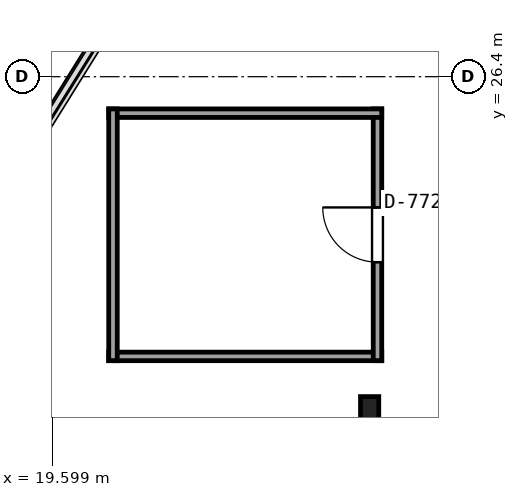
"""IFC4 building model, lengths in metres.
Left out: names, types, materials, properties, quantities, classifications, styles, units other than length and angle.
Written with IfcOpenShell. Run it as: python <this file> out.ifc"""

import sys

from ifc_helpers import new_model, si_unit, direction, frame, frame_2d, origin, origin_2d, place, context, subcontext, project, spatial, rectangle, i_section, extrude, element, fill, save


model = new_model("IFC4")
c1 = context("Model", 3, precision=1e-05, world=origin(), true_north=direction((0.0, 1.0)))
c2 = subcontext(c1, "Body", "Model", "MODEL_VIEW")
j1 = project(units=[si_unit("LENGTHUNIT", "METRE"), si_unit("PLANEANGLEUNIT", "RADIAN")], contexts=[c1])
p1 = place(None, origin())
s1 = spatial("IfcSite", under=j1, at=p1, CompositionType="ELEMENT")
p2 = place(p1, origin())
s2 = spatial("IfcBuilding", under=s1, at=p2, CompositionType="ELEMENT")
p3 = place(p2, frame((0.0, 0.0, 286.7)))
s3 = spatial("IfcBuildingStorey", under=s2, at=p3, CompositionType="ELEMENT", Elevation=286.7)
p4 = place(p3, frame((24.821, 20.889, 0.0), z_axis=(0.0, 0.0, 1.0), x_axis=(1.0, 0.0, 0.0)))
e1 = element("IfcColumn", 1, at=p4, inside=s3, PredefinedType="COLUMN", context=c2, shape_type="SweptSolid", body=[
    extrude(i_section(OverallWidth=0.3, OverallDepth=0.5, WebThickness=0.015, FlangeThickness=0.028, at=origin_2d()), origin(), (0.0, 0.0, 1.0), 2.78),
])
p5 = place(p3, frame((20.53, 21.8, 0.0), z_axis=(0.0, 0.0, 1.0), x_axis=(1.0, 0.0, 0.0)))
e2 = element("IfcWall", 2, at=p5, inside=s3, PredefinedType="PARTITIONING", context=c2, shape_type="SweptSolid", body=[
    extrude(rectangle(XDim=4.49, YDim=0.14, at=frame_2d((2.245, 0.0))), origin(), (0.0, 0.0, 1.0), 2.305),
])
p6 = place(p3, frame((24.95, 21.73, 0.0), z_axis=(0.0, 0.0, 1.0), x_axis=(0.0, 1.0, 0.0)))
e3 = element("IfcWall", 3, at=p6, inside=s3, PredefinedType="PARTITIONING", context=c2, shape_type="SweptSolid", body=[
    extrude(rectangle(XDim=4.14, YDim=0.14, at=frame_2d((2.07, 0.0))), origin(), (0.0, 0.0, 1.0), 2.78),
])
p7 = place(p6, frame((1.62, 0.0, 0.0)))
e4 = element("IfcOpeningElement", 4, at=p7, cuts=e3, PredefinedType="OPENING", context=c2, shape_type="SweptSolid", body=[
    extrude(rectangle(XDim=0.9, YDim=2.0, at=frame_2d((0.45, 1.0))), frame((0.0, 0.08, 0.0), z_axis=(0.0, -1.0, 0.0), x_axis=(1.0, 0.0, 0.0)), (0.0, 0.0, 1.0), 0.16),
])
p8 = place(p3, frame((25.02, 25.8, 0.0), z_axis=(0.0, 0.0, 1.0), x_axis=(-1.0, 0.0, 0.0)))
e5 = element("IfcWall", 5, at=p8, inside=s3, PredefinedType="PARTITIONING", context=c2, shape_type="SweptSolid", body=[
    extrude(rectangle(XDim=4.49, YDim=0.14, at=frame_2d((2.245, 0.0))), origin(), (0.0, 0.0, 1.0), 2.305),
])
p9 = place(p3, frame((20.6, 25.87, 0.0), z_axis=(0.0, 0.0, 1.0), x_axis=(0.0, -1.0, 0.0)))
e6 = element("IfcWall", 6, at=p9, inside=s3, PredefinedType="PARTITIONING", context=c2, shape_type="SweptSolid", body=[
    extrude(rectangle(XDim=4.14, YDim=0.14, at=frame_2d((2.07, 0.0))), origin(), (0.0, 0.0, 1.0), 2.78),
])
p10 = place(p7, origin())
e7 = element("IfcDoor", 7, at=p10, inside=s3, OperationType="SINGLE_SWING_RIGHT", PredefinedType="DOOR", context=c2, shape_type="SweptSolid", body=[
    extrude(rectangle(XDim=0.9, YDim=2.0, at=frame_2d((0.45, 1.0))), frame((0.0, 0.025, 0.0), z_axis=(0.0, -1.0, 0.0), x_axis=(1.0, 0.0, 0.0)), (0.0, 0.0, 1.0), 0.05),
])
fill(e4, e7)
save(model, sys.argv[1])
